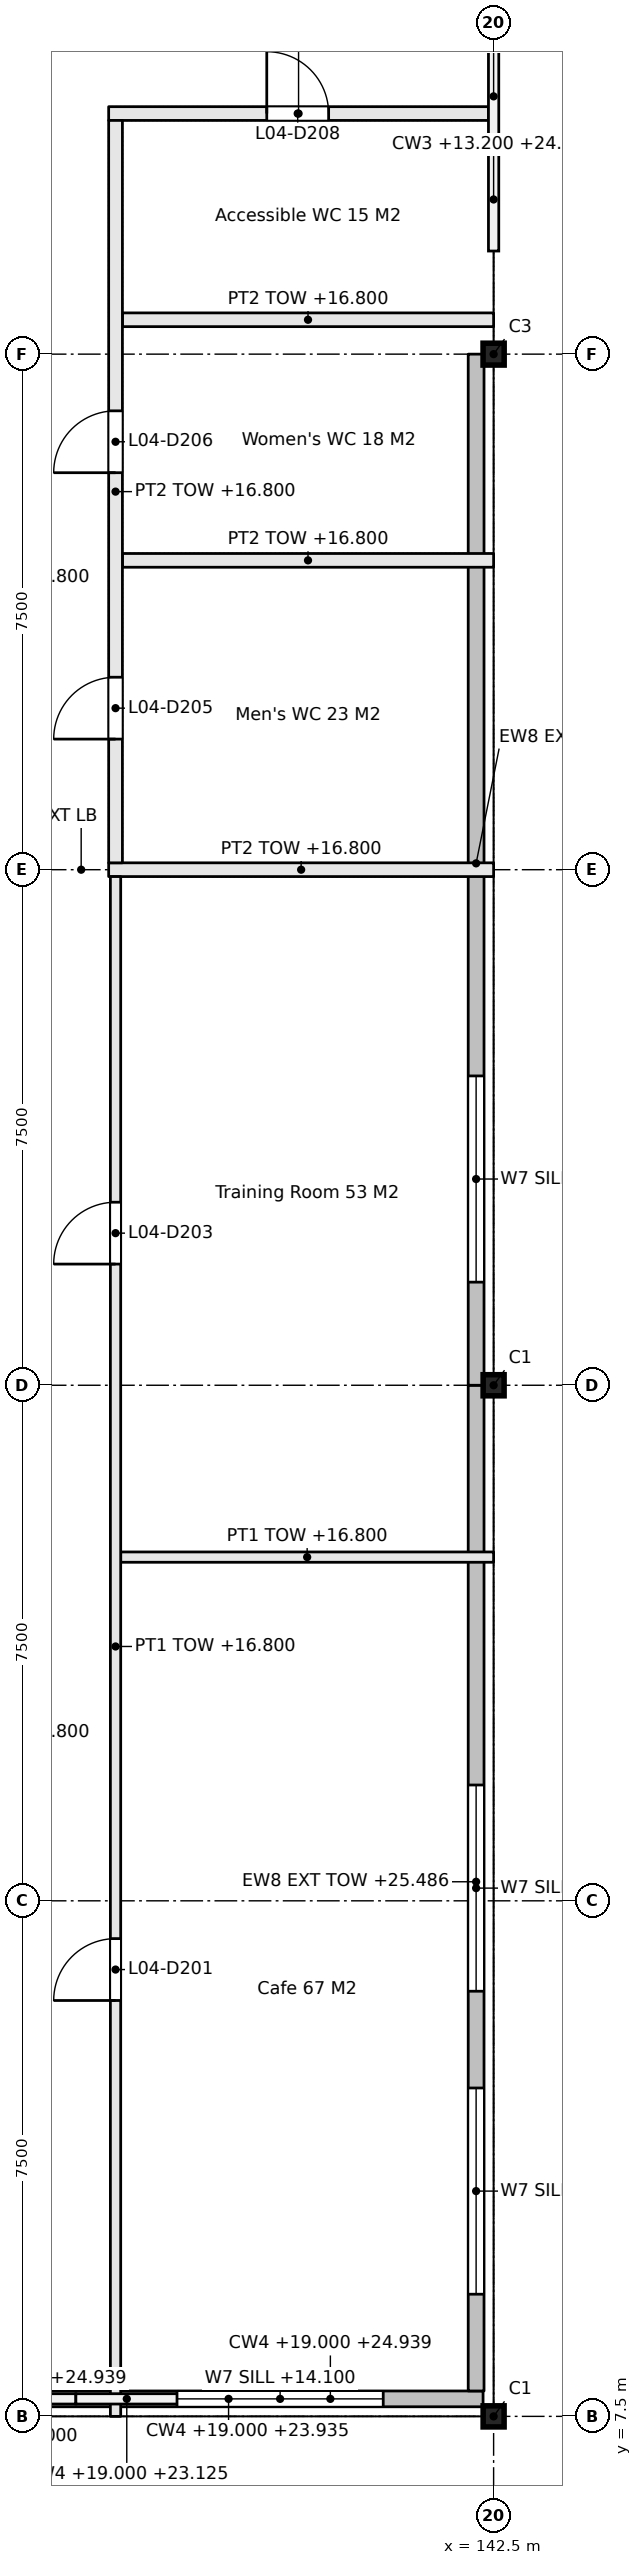
"""IFC4 building model, lengths in metres.
Left out: names, types, materials, properties, quantities, classifications, styles, units other than length and angle.
Written with IfcOpenShell. Run it as: python <this file> out.ifc"""

import sys

from ifc_helpers import new_model, si_unit, direction, frame, frame_2d, origin, origin_2d, place, context, subcontext, project, spatial, rectangle, i_section, extrude, element, fill, save


model = new_model("IFC4")
c1 = context("Model", 3, precision=1e-05, world=origin(), true_north=direction((0.0, 1.0)))
c2 = subcontext(c1, "Body", "Model", "MODEL_VIEW")
j1 = project(units=[si_unit("LENGTHUNIT", "METRE"), si_unit("PLANEANGLEUNIT", "RADIAN")], contexts=[c1])
p1 = place(None, origin())
s1 = spatial("IfcSite", under=j1, at=p1, CompositionType="ELEMENT")
p2 = place(p1, origin())
s2 = spatial("IfcBuilding", under=s1, at=p2, CompositionType="ELEMENT")
p3 = place(p2, frame((0.0, 0.0, 13.2)))
s3 = spatial("IfcBuildingStorey", under=s2, at=p3, CompositionType="ELEMENT", Elevation=13.2)
for number, where, z_axis, x_axis in (
    (1, (142.5, 7.5, 0.0), (0.0, 0.0, 1.0), (1.0, 0.0, 0.0)),
    (2, (142.5, 22.5, 0.0), (0.0, 0.0, 1.0), (1.0, 0.0, 0.0)),
):
    element("IfcColumn", number, at=place(p3, frame(where, z_axis=z_axis, x_axis=x_axis)), inside=s3, PredefinedType="COLUMN", context=c2, shape_type="SweptSolid", body=[
        extrude(i_section(OverallWidth=0.305, OverallDepth=0.307, WebThickness=0.01, FlangeThickness=0.015, FilletRadius=0.015, at=origin_2d()), origin(), (0.0, 0.0, 1.0), 11.2),
    ])
p4 = place(p3, frame((142.5, 37.5, 0.0), z_axis=(0.0, 0.0, 1.0), x_axis=(1.0, 0.0, 0.0)))
e3 = element("IfcColumn", 3, at=p4, inside=s3, PredefinedType="COLUMN", context=c2, shape_type="SweptSolid", body=[
    extrude(i_section(OverallWidth=0.307, OverallDepth=0.318, WebThickness=0.013, FlangeThickness=0.021, FilletRadius=0.015, at=origin_2d()), origin(), (0.0, 0.0, 1.0), 11.2),
])
p5 = place(p3, frame((137.075, 20.0, 0.0), z_axis=(0.0, 0.0, 1.0), x_axis=(1.0, 0.0, 0.0)))
e4 = element("IfcWall", 4, at=p5, inside=s3, PredefinedType="PARTITIONING", context=c2, shape_type="SweptSolid", body=[
    extrude(rectangle(XDim=5.425, YDim=0.15, at=frame_2d((2.712, 0.0))), origin(), (0.0, 0.0, 1.0), 3.6),
])
p6 = place(p3, frame((136.9, 30.0, 0.0), z_axis=(0.0, 0.0, 1.0), x_axis=(1.0, 0.0, 0.0)))
e5 = element("IfcWall", 5, at=p6, inside=s3, PredefinedType="PARTITIONING", context=c2, shape_type="SweptSolid", body=[
    extrude(rectangle(XDim=5.6, YDim=0.2, at=frame_2d((2.8, 0.0))), origin(), (0.0, 0.0, 1.0), 3.6),
])
for number, where, z_axis, x_axis in (
    (6, (137.1, 34.5, 0.0), (0.0, 0.0, 1.0), (1.0, 0.0, 0.0)),
    (7, (137.1, 38.0, 0.0), (0.0, 0.0, 1.0), (1.0, 0.0, 0.0)),
):
    element("IfcWall", number, at=place(p3, frame(where, z_axis=z_axis, x_axis=x_axis)), inside=s3, PredefinedType="PARTITIONING", context=c2, shape_type="SweptSolid", body=[
        extrude(rectangle(XDim=5.4, YDim=0.2, at=frame_2d((2.7, 0.0))), origin(), (0.0, 0.0, 1.0), 3.6),
    ])
p7 = place(p3, frame((136.9, 41.0, 0.0), z_axis=(0.0, 0.0, 1.0), x_axis=(1.0, 0.0, 0.0)))
e8 = element("IfcWall", 8, at=p7, inside=s3, PredefinedType="PARTITIONING", context=c2, shape_type="SweptSolid", body=[
    extrude(rectangle(XDim=5.525, YDim=0.2, at=frame_2d((2.763, 0.0))), origin(), (0.0, 0.0, 1.0), 3.6),
])
p8 = place(p7, frame((2.3, 0.0, 0.0)))
e9 = element("IfcOpeningElement", 9, at=p8, cuts=e8, PredefinedType="OPENING", context=c2, shape_type="SweptSolid", body=[
    extrude(rectangle(XDim=0.9, YDim=2.1, at=frame_2d((0.45, 1.05))), frame((0.0, 0.11, 0.0), z_axis=(0.0, -1.0, 0.0), x_axis=(1.0, 0.0, 0.0)), (0.0, 0.0, 1.0), 0.22),
])
p9 = place(p3, frame((137.0, 7.5, 0.0), z_axis=(0.0, 0.0, 1.0), x_axis=(0.0, 1.0, 0.0)))
e10 = element("IfcWall", 10, at=p9, inside=s3, PredefinedType="PARTITIONING", context=c2, shape_type="SweptSolid", body=[
    extrude(rectangle(XDim=22.4, YDim=0.15, at=frame_2d((11.2, 0.0))), origin(), (0.0, 0.0, 1.0), 3.6),
])
p10 = place(p9, frame((6.05, 0.0, 0.0)))
e11 = element("IfcOpeningElement", 11, at=p10, cuts=e10, PredefinedType="OPENING", context=c2, shape_type="SweptSolid", body=[
    extrude(rectangle(XDim=0.9, YDim=2.1, at=frame_2d((0.45, 1.05))), frame((0.0, 0.085, 0.0), z_axis=(0.0, -1.0, 0.0), x_axis=(1.0, 0.0, 0.0)), (0.0, 0.0, 1.0), 0.17),
])
p11 = place(p9, frame((16.763, 0.0, 0.0)))
e12 = element("IfcOpeningElement", 12, at=p11, cuts=e10, PredefinedType="OPENING", context=c2, shape_type="SweptSolid", body=[
    extrude(rectangle(XDim=0.9, YDim=2.1, at=frame_2d((0.45, 1.05))), frame((0.0, 0.085, 0.0), z_axis=(0.0, -1.0, 0.0), x_axis=(1.0, 0.0, 0.0)), (0.0, 0.0, 1.0), 0.17),
])
p12 = place(p3, frame((137.0, 30.1, 0.0), z_axis=(0.0, 0.0, 1.0), x_axis=(0.0, 1.0, 0.0)))
e13 = element("IfcWall", 13, at=p12, inside=s3, PredefinedType="PARTITIONING", context=c2, shape_type="SweptSolid", body=[
    extrude(rectangle(XDim=10.8, YDim=0.2, at=frame_2d((5.4, 0.0))), origin(), (0.0, 0.0, 1.0), 3.6),
])
p13 = place(p12, frame((1.8, 0.0, 0.0)))
e14 = element("IfcOpeningElement", 14, at=p13, cuts=e13, PredefinedType="OPENING", context=c2, shape_type="SweptSolid", body=[
    extrude(rectangle(XDim=0.9, YDim=2.1, at=frame_2d((0.45, 1.05))), frame((0.0, 0.11, 0.0), z_axis=(0.0, -1.0, 0.0), x_axis=(1.0, 0.0, 0.0)), (0.0, 0.0, 1.0), 0.22),
])
p14 = place(p12, frame((5.675, 0.0, 0.0)))
e15 = element("IfcOpeningElement", 15, at=p14, cuts=e13, PredefinedType="OPENING", context=c2, shape_type="SweptSolid", body=[
    extrude(rectangle(XDim=0.9, YDim=2.1, at=frame_2d((0.45, 1.05))), frame((0.0, 0.11, 0.0), z_axis=(0.0, -1.0, 0.0), x_axis=(1.0, 0.0, 0.0)), (0.0, 0.0, 1.0), 0.22),
])
p15 = place(p3, frame((127.538, 7.755, 0.0), z_axis=(0.0, 0.0, 1.0), x_axis=(1.0, 0.0, 0.0)))
e16 = element("IfcWall", 16, at=p15, inside=s3, PredefinedType="SOLIDWALL", context=c2, shape_type="SweptSolid", body=[
    extrude(rectangle(XDim=14.809, YDim=0.23, at=frame_2d((7.404, 0.0))), origin(), (0.0, 0.0, 1.0), 5.8),
])
p16 = place(p15, frame((10.357, 0.0, 0.9)))
e17 = element("IfcOpeningElement", 17, at=p16, cuts=e16, PredefinedType="OPENING", context=c2, shape_type="SweptSolid", body=[
    extrude(rectangle(XDim=3.0, YDim=1.5, at=frame_2d((1.5, 0.75))), frame((0.0, 0.125, 0.0), z_axis=(0.0, -1.0, 0.0), x_axis=(1.0, 0.0, 0.0)), (0.0, 0.0, 1.0), 0.25),
])
p17 = place(p3, frame((142.246, 7.87, 0.0), z_axis=(0.0, 0.0, 1.0), x_axis=(0.0, 1.0, 0.0)))
e18 = element("IfcWall", 18, at=p17, inside=s3, PredefinedType="SOLIDWALL", context=c2, shape_type="SweptSolid", body=[
    extrude(rectangle(XDim=14.63, YDim=0.23, at=frame_2d((7.315, 0.0))), origin(), (0.0, 0.0, 1.0), 12.286),
])
p18 = place(p17, frame((1.408, 0.0, 0.9)))
e19 = element("IfcOpeningElement", 19, at=p18, cuts=e18, PredefinedType="OPENING", context=c2, shape_type="SweptSolid", body=[
    extrude(rectangle(XDim=3.0, YDim=1.5, at=frame_2d((1.5, 0.75))), frame((0.0, 0.125, 0.0), z_axis=(0.0, -1.0, 0.0), x_axis=(1.0, 0.0, 0.0)), (0.0, 0.0, 1.0), 0.25),
])
p19 = place(p17, frame((5.815, 0.0, 0.9)))
e20 = element("IfcOpeningElement", 20, at=p19, cuts=e18, PredefinedType="OPENING", context=c2, shape_type="SweptSolid", body=[
    extrude(rectangle(XDim=3.0, YDim=1.5, at=frame_2d((1.5, 0.75))), frame((0.0, 0.125, 0.0), z_axis=(0.0, -1.0, 0.0), x_axis=(1.0, 0.0, 0.0)), (0.0, 0.0, 1.0), 0.25),
])
p20 = place(p3, frame((142.246, 22.5, 0.0), z_axis=(0.0, 0.0, 1.0), x_axis=(0.0, 1.0, 0.0)))
e21 = element("IfcWall", 21, at=p20, inside=s3, PredefinedType="SOLIDWALL", context=c2, shape_type="SweptSolid", body=[
    extrude(rectangle(XDim=15.0, YDim=0.23, at=frame_2d((7.5, 0.0))), origin(), (0.0, 0.0, 1.0), 12.286),
])
p21 = place(p20, frame((1.5, 0.0, 0.9)))
e22 = element("IfcOpeningElement", 22, at=p21, cuts=e21, PredefinedType="OPENING", context=c2, shape_type="SweptSolid", body=[
    extrude(rectangle(XDim=3.0, YDim=1.5, at=frame_2d((1.5, 0.75))), frame((0.0, 0.125, 0.0), z_axis=(0.0, -1.0, 0.0), x_axis=(1.0, 0.0, 0.0)), (0.0, 0.0, 1.0), 0.25),
])
p22 = place(p10, origin())
e23 = element("IfcDoor", 23, at=p22, inside=s3, OperationType="SINGLE_SWING_LEFT", PredefinedType="DOOR", context=c2, shape_type="SweptSolid", body=[
    extrude(rectangle(XDim=0.9, YDim=2.1, at=frame_2d((0.45, 1.05))), frame((0.0, 0.025, 0.0), z_axis=(0.0, -1.0, 0.0), x_axis=(1.0, 0.0, 0.0)), (0.0, 0.0, 1.0), 0.05),
])
fill(e11, e23)
p23 = place(p11, origin())
e24 = element("IfcDoor", 24, at=p23, inside=s3, OperationType="SINGLE_SWING_RIGHT", PredefinedType="DOOR", context=c2, shape_type="SweptSolid", body=[
    extrude(rectangle(XDim=0.9, YDim=2.1, at=frame_2d((0.45, 1.05))), frame((0.0, 0.025, 0.0), z_axis=(0.0, -1.0, 0.0), x_axis=(1.0, 0.0, 0.0)), (0.0, 0.0, 1.0), 0.05),
])
fill(e12, e24)
p24 = place(p13, origin())
e25 = element("IfcDoor", 25, at=p24, inside=s3, OperationType="SINGLE_SWING_LEFT", PredefinedType="DOOR", context=c2, shape_type="SweptSolid", body=[
    extrude(rectangle(XDim=0.9, YDim=2.1, at=frame_2d((0.45, 1.05))), frame((0.0, 0.025, 0.0), z_axis=(0.0, -1.0, 0.0), x_axis=(1.0, 0.0, 0.0)), (0.0, 0.0, 1.0), 0.05),
])
fill(e14, e25)
p25 = place(p14, origin())
e26 = element("IfcDoor", 26, at=p25, inside=s3, OperationType="SINGLE_SWING_RIGHT", PredefinedType="DOOR", context=c2, shape_type="SweptSolid", body=[
    extrude(rectangle(XDim=0.9, YDim=2.1, at=frame_2d((0.45, 1.05))), frame((0.0, 0.025, 0.0), z_axis=(0.0, -1.0, 0.0), x_axis=(1.0, 0.0, 0.0)), (0.0, 0.0, 1.0), 0.05),
])
fill(e15, e26)
p26 = place(p8, origin())
e27 = element("IfcDoor", 27, at=p26, inside=s3, OperationType="SINGLE_SWING_LEFT", PredefinedType="DOOR", context=c2, shape_type="SweptSolid", body=[
    extrude(rectangle(XDim=0.9, YDim=2.1, at=frame_2d((0.45, 1.05))), frame((0.0, 0.025, 0.0), z_axis=(0.0, -1.0, 0.0), x_axis=(1.0, 0.0, 0.0)), (0.0, 0.0, 1.0), 0.05),
])
fill(e9, e27)
p27 = place(p16, origin())
e28 = element("IfcWindow", 28, at=p27, inside=s3, PartitioningType="TRIPLE_PANEL_VERTICAL", PredefinedType="WINDOW", context=c2, shape_type="SweptSolid", body=[
    extrude(rectangle(XDim=3.0, YDim=1.5, at=frame_2d((1.5, 0.75))), frame((0.0, 0.03, 0.0), z_axis=(0.0, -1.0, 0.0), x_axis=(1.0, 0.0, 0.0)), (0.0, 0.0, 1.0), 0.06),
])
fill(e17, e28)
p28 = place(p18, origin())
e29 = element("IfcWindow", 29, at=p28, inside=s3, PartitioningType="TRIPLE_PANEL_VERTICAL", PredefinedType="WINDOW", context=c2, shape_type="SweptSolid", body=[
    extrude(rectangle(XDim=3.0, YDim=1.5, at=frame_2d((1.5, 0.75))), frame((0.0, 0.03, 0.0), z_axis=(0.0, -1.0, 0.0), x_axis=(1.0, 0.0, 0.0)), (0.0, 0.0, 1.0), 0.06),
])
fill(e19, e29)
p29 = place(p19, origin())
e30 = element("IfcWindow", 30, at=p29, inside=s3, PartitioningType="TRIPLE_PANEL_VERTICAL", PredefinedType="WINDOW", context=c2, shape_type="SweptSolid", body=[
    extrude(rectangle(XDim=3.0, YDim=1.5, at=frame_2d((1.5, 0.75))), frame((0.0, 0.03, 0.0), z_axis=(0.0, -1.0, 0.0), x_axis=(1.0, 0.0, 0.0)), (0.0, 0.0, 1.0), 0.06),
])
fill(e20, e30)
p30 = place(p21, origin())
e31 = element("IfcWindow", 31, at=p30, inside=s3, PartitioningType="TRIPLE_PANEL_VERTICAL", PredefinedType="WINDOW", context=c2, shape_type="SweptSolid", body=[
    extrude(rectangle(XDim=3.0, YDim=1.5, at=frame_2d((1.5, 0.75))), frame((0.0, 0.03, 0.0), z_axis=(0.0, -1.0, 0.0), x_axis=(1.0, 0.0, 0.0)), (0.0, 0.0, 1.0), 0.06),
])
fill(e22, e31)
save(model, sys.argv[1])
